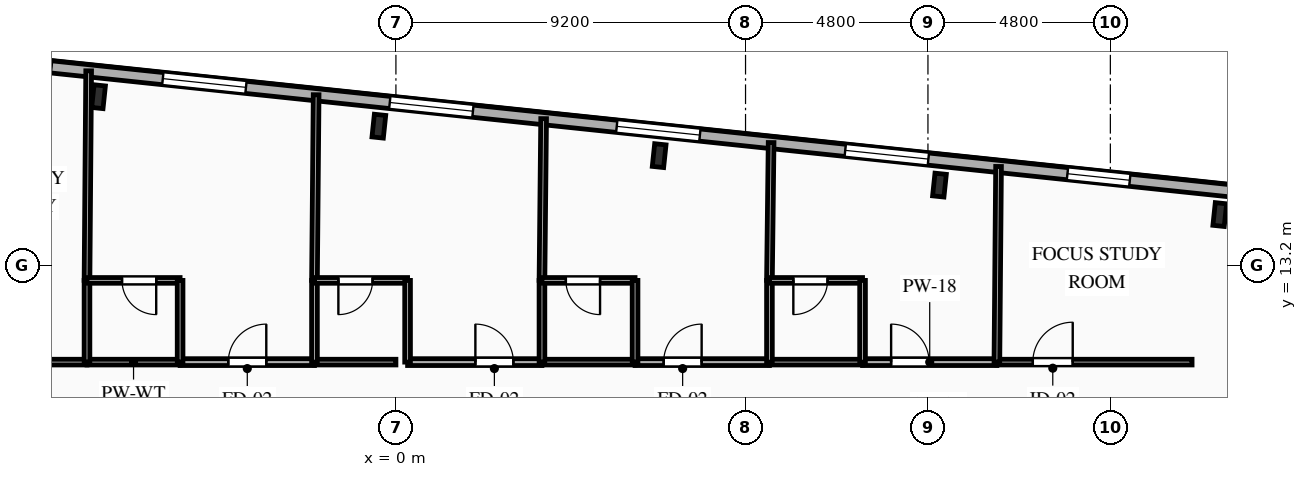
"""IFC4 building model, lengths in metres.
Left out: names, types, materials, properties, quantities, classifications, styles, units other than length and angle.
Written with IfcOpenShell. Run it as: python <this file> out.ifc"""

import sys

from ifc_helpers import new_model, si_unit, direction, frame, frame_2d, origin, origin_2d, place, context, subcontext, project, spatial, rectangle, i_section, extrude, element, fill, save


model = new_model("IFC4")
c1 = context("Model", 3, precision=1e-05, world=origin(), true_north=direction((0.0, 1.0)))
c2 = subcontext(c1, "Body", "Model", "MODEL_VIEW")
j1 = project(units=[si_unit("LENGTHUNIT", "METRE"), si_unit("PLANEANGLEUNIT", "RADIAN")], contexts=[c1])
p1 = place(None, origin())
s1 = spatial("IfcSite", under=j1, at=p1, CompositionType="ELEMENT")
p2 = place(p1, origin())
s2 = spatial("IfcBuilding", under=s1, at=p2, CompositionType="ELEMENT")
p3 = place(p2, frame((0.0, 0.0, 183.0)))
s3 = spatial("IfcBuildingStorey", under=s2, at=p3, CompositionType="ELEMENT", Elevation=183.0)
for number, where, z_axis, x_axis in (
    (1, (21.679, 14.532, 0.0), (0.0, 0.0, 1.0), (0.995, -0.105, 0.0)),
    (2, (14.303, 15.308, 0.0), (0.0, 0.0, 1.0), (0.995, -0.105, 0.0)),
    (3, (6.927, 16.083, 0.0), (0.0, 0.0, 1.0), (0.995, -0.105, 0.0)),
    (4, (-0.449, 16.858, 0.0), (0.0, 0.0, 1.0), (0.995, -0.105, 0.0)),
    (5, (-7.825, 17.634, 0.0), (0.0, 0.0, 1.0), (0.995, -0.105, 0.0)),
):
    element("IfcColumn", number, at=place(p3, frame(where, z_axis=z_axis, x_axis=x_axis)), inside=s3, PredefinedType="COLUMN", context=c2, shape_type="SweptSolid", body=[
        extrude(i_section(OverallWidth=0.3, OverallDepth=0.6, WebThickness=0.015, FlangeThickness=0.03, FilletRadius=0.027, at=origin_2d()), origin(), (0.0, 0.0, 1.0), 3.35),
    ])
p4 = place(p3, frame((-23.156, 19.898, 0.0), z_axis=(0.0, 0.0, 1.0), x_axis=(0.994522001802, -0.104527450613, 0.0)))
e6 = element("IfcWall", 6, at=p4, inside=s3, PredefinedType="SOLIDWALL", context=c2, shape_type="SweptSolid", body=[
    extrude(rectangle(XDim=45.8, YDim=0.32, at=frame_2d((22.9, 0.0))), origin(), (0.0, 0.0, 1.0), 3.04),
])
p5 = place(p4, frame((4.94, 0.0, 0.85)))
e7 = element("IfcOpeningElement", 7, at=p5, cuts=e6, PredefinedType="OPENING", context=c2, shape_type="SweptSolid", body=[
    extrude(rectangle(XDim=1.65, YDim=1.85, at=frame_2d((0.825, 0.925))), frame((0.0, 0.17, 0.0), z_axis=(0.0, -1.0, 0.0), x_axis=(1.0, 0.0, 0.0)), (0.0, 0.0, 1.0), 0.34),
])
p6 = place(p4, frame((12.572, 0.0, 0.85)))
e8 = element("IfcOpeningElement", 8, at=p6, cuts=e6, PredefinedType="OPENING", context=c2, shape_type="SweptSolid", body=[
    extrude(rectangle(XDim=1.6, YDim=1.85, at=frame_2d((0.8, 0.925))), frame((0.0, 0.17, 0.0), z_axis=(0.0, -1.0, 0.0), x_axis=(1.0, 0.0, 0.0)), (0.0, 0.0, 1.0), 0.34),
])
p7 = place(p4, frame((17.116, 0.0, 0.85)))
e9 = element("IfcOpeningElement", 9, at=p7, cuts=e6, PredefinedType="OPENING", context=c2, shape_type="SweptSolid", body=[
    extrude(rectangle(XDim=2.2, YDim=1.85, at=frame_2d((1.1, 0.925))), frame((0.0, 0.17, 0.0), z_axis=(0.0, -1.0, 0.0), x_axis=(1.0, 0.0, 0.0)), (0.0, 0.0, 1.0), 0.34),
])
p8 = place(p4, frame((23.121, 0.0, 0.85)))
e10 = element("IfcOpeningElement", 10, at=p8, cuts=e6, PredefinedType="OPENING", context=c2, shape_type="SweptSolid", body=[
    extrude(rectangle(XDim=2.2, YDim=1.85, at=frame_2d((1.1, 0.925))), frame((0.0, 0.17, 0.0), z_axis=(0.0, -1.0, 0.0), x_axis=(1.0, 0.0, 0.0)), (0.0, 0.0, 1.0), 0.34),
])
p9 = place(p4, frame((29.126, 0.0, 0.85)))
e11 = element("IfcOpeningElement", 11, at=p9, cuts=e6, PredefinedType="OPENING", context=c2, shape_type="SweptSolid", body=[
    extrude(rectangle(XDim=2.2, YDim=1.85, at=frame_2d((1.1, 0.925))), frame((0.0, 0.17, 0.0), z_axis=(0.0, -1.0, 0.0), x_axis=(1.0, 0.0, 0.0)), (0.0, 0.0, 1.0), 0.34),
])
p10 = place(p4, frame((35.172, 0.0, 0.85)))
e12 = element("IfcOpeningElement", 12, at=p10, cuts=e6, PredefinedType="OPENING", context=c2, shape_type="SweptSolid", body=[
    extrude(rectangle(XDim=2.2, YDim=1.85, at=frame_2d((1.1, 0.925))), frame((0.0, 0.17, 0.0), z_axis=(0.0, -1.0, 0.0), x_axis=(1.0, 0.0, 0.0)), (0.0, 0.0, 1.0), 0.34),
])
p11 = place(p4, frame((41.052, 0.0, 0.85)))
e13 = element("IfcOpeningElement", 13, at=p11, cuts=e6, PredefinedType="OPENING", context=c2, shape_type="SweptSolid", body=[
    extrude(rectangle(XDim=1.65, YDim=1.85, at=frame_2d((0.825, 0.925))), frame((0.0, 0.17, 0.0), z_axis=(0.0, -1.0, 0.0), x_axis=(1.0, 0.0, 0.0)), (0.0, 0.0, 1.0), 0.34),
])
p12 = place(p3, frame((-11.764, 10.65, 0.0), z_axis=(0.0, 0.0, 1.0), x_axis=(1.0, 0.0, 0.0)))
e14 = element("IfcWall", 14, at=p12, inside=s3, PredefinedType="PARTITIONING", context=c2, shape_type="SweptSolid", body=[
    extrude(rectangle(XDim=3.635, YDim=0.15, at=frame_2d((1.817, 0.0))), origin(), (0.0, 0.0, 1.0), 3.04),
])
p13 = place(p12, frame((0.771, 0.0, 0.0)))
e15 = element("IfcOpeningElement", 15, at=p13, cuts=e14, PredefinedType="OPENING", context=c2, shape_type="SweptSolid", body=[
    extrude(rectangle(XDim=0.95, YDim=2.1, at=frame_2d((0.475, 1.05))), frame((0.0, 0.085, 0.0), z_axis=(0.0, -1.0, 0.0), x_axis=(1.0, 0.0, 0.0)), (0.0, 0.0, 1.0), 0.17),
])
p14 = place(p3, frame((-5.679, 10.65, 0.0), z_axis=(0.0, 0.0, 1.0), x_axis=(1.0, 0.0, 0.0)))
e16 = element("IfcWall", 16, at=p14, inside=s3, PredefinedType="PARTITIONING", context=c2, shape_type="SweptSolid", body=[
    extrude(rectangle(XDim=3.536, YDim=0.18, at=frame_2d((1.768, 0.0))), origin(), (0.0, 0.0, 1.0), 3.04),
])
p15 = place(p14, frame((1.268, 0.0, 0.0)))
e17 = element("IfcOpeningElement", 17, at=p15, cuts=e16, PredefinedType="OPENING", context=c2, shape_type="SweptSolid", body=[
    extrude(rectangle(XDim=1.0, YDim=2.15, at=frame_2d((0.5, 1.075))), frame((0.0, 0.1, 0.0), z_axis=(0.0, -1.0, 0.0), x_axis=(1.0, 0.0, 0.0)), (0.0, 0.0, 1.0), 0.2),
])
p16 = place(p3, frame((-8.129, 10.65, 0.0), z_axis=(0.0, 0.0, 1.0), x_axis=(1.0, 0.0, 0.0)))
e18 = element("IfcWall", 18, at=p16, inside=s3, PredefinedType="PLUMBINGWALL", context=c2, shape_type="SweptSolid", body=[
    extrude(rectangle(XDim=2.45, YDim=0.15, at=frame_2d((1.225, 0.0))), origin(), (0.0, 0.0, 1.0), 3.04),
])
p17 = place(p3, frame((-2.143, 10.65, 0.0), z_axis=(0.0, 0.0, 1.0), x_axis=(1.0, 0.0, 0.0)))
e19 = element("IfcWall", 19, at=p17, inside=s3, PredefinedType="PLUMBINGWALL", context=c2, shape_type="SweptSolid", body=[
    extrude(rectangle(XDim=2.143, YDim=0.15, at=frame_2d((1.072, 0.0))), origin(), (0.0, 0.0, 1.0), 3.04),
])
p18 = place(p3, frame((0.307, 10.65, 0.0), z_axis=(0.0, 0.0, 1.0), x_axis=(1.0, 0.0, 0.0)))
e20 = element("IfcWall", 20, at=p18, inside=s3, PredefinedType="PARTITIONING", context=c2, shape_type="SweptSolid", body=[
    extrude(rectangle(XDim=3.536, YDim=0.18, at=frame_2d((1.768, 0.0))), origin(), (0.0, 0.0, 1.0), 3.04),
])
p19 = place(p18, frame((1.784, 0.0, 0.0)))
e21 = element("IfcOpeningElement", 21, at=p19, cuts=e20, PredefinedType="OPENING", context=c2, shape_type="SweptSolid", body=[
    extrude(rectangle(XDim=1.0, YDim=2.15, at=frame_2d((0.5, 1.075))), frame((0.0, 0.1, 0.0), z_axis=(0.0, -1.0, 0.0), x_axis=(1.0, 0.0, 0.0)), (0.0, 0.0, 1.0), 0.2),
])
p20 = place(p3, frame((6.293, 10.65, 0.0), z_axis=(0.0, 0.0, 1.0), x_axis=(1.0, 0.0, 0.0)))
e22 = element("IfcWall", 22, at=p20, inside=s3, PredefinedType="PARTITIONING", context=c2, shape_type="SweptSolid", body=[
    extrude(rectangle(XDim=3.536, YDim=0.18, at=frame_2d((1.768, 0.0))), origin(), (0.0, 0.0, 1.0), 3.04),
])
p21 = place(p20, frame((0.752, 0.0, 0.0)))
e23 = element("IfcOpeningElement", 23, at=p21, cuts=e22, PredefinedType="OPENING", context=c2, shape_type="SweptSolid", body=[
    extrude(rectangle(XDim=1.0, YDim=2.15, at=frame_2d((0.5, 1.075))), frame((0.0, 0.1, 0.0), z_axis=(0.0, -1.0, 0.0), x_axis=(1.0, 0.0, 0.0)), (0.0, 0.0, 1.0), 0.2),
])
p22 = place(p3, frame((3.843, 10.65, 0.0), z_axis=(0.0, 0.0, 1.0), x_axis=(1.0, 0.0, 0.0)))
e24 = element("IfcWall", 24, at=p22, inside=s3, PredefinedType="PLUMBINGWALL", context=c2, shape_type="SweptSolid", body=[
    extrude(rectangle(XDim=2.45, YDim=0.15, at=frame_2d((1.225, 0.0))), origin(), (0.0, 0.0, 1.0), 3.04),
])
p23 = place(p3, frame((12.279, 10.65, 0.0), z_axis=(0.0, 0.0, 1.0), x_axis=(1.0, 0.0, 0.0)))
e25 = element("IfcWall", 25, at=p23, inside=s3, PredefinedType="PARTITIONING", context=c2, shape_type="SweptSolid", body=[
    extrude(rectangle(XDim=3.535, YDim=0.18, at=frame_2d((1.768, 0.0))), origin(), (0.0, 0.0, 1.0), 3.04),
])
p24 = place(p23, frame((0.752, 0.0, 0.0)))
e26 = element("IfcOpeningElement", 26, at=p24, cuts=e25, PredefinedType="OPENING", context=c2, shape_type="SweptSolid", body=[
    extrude(rectangle(XDim=1.0, YDim=2.15, at=frame_2d((0.5, 1.075))), frame((0.0, 0.1, 0.0), z_axis=(0.0, -1.0, 0.0), x_axis=(1.0, 0.0, 0.0)), (0.0, 0.0, 1.0), 0.2),
])
p25 = place(p3, frame((9.829, 10.65, 0.0), z_axis=(0.0, 0.0, 1.0), x_axis=(1.0, 0.0, 0.0)))
e27 = element("IfcWall", 27, at=p25, inside=s3, PredefinedType="PLUMBINGWALL", context=c2, shape_type="SweptSolid", body=[
    extrude(rectangle(XDim=2.45, YDim=0.15, at=frame_2d((1.225, 0.0))), origin(), (0.0, 0.0, 1.0), 3.04),
])
p26 = place(p3, frame((15.814, 10.65, 0.0), z_axis=(0.0, 0.0, 1.0), x_axis=(1.0, 0.0, 0.0)))
e28 = element("IfcWall", 28, at=p26, inside=s3, PredefinedType="PARTITIONING", context=c2, shape_type="SweptSolid", body=[
    extrude(rectangle(XDim=5.136, YDim=0.15, at=frame_2d((2.568, 0.0))), origin(), (0.0, 0.0, 1.0), 3.04),
])
p27 = place(p26, frame((0.946, 0.0, 0.0)))
e29 = element("IfcOpeningElement", 29, at=p27, cuts=e28, PredefinedType="OPENING", context=c2, shape_type="SweptSolid", body=[
    extrude(rectangle(XDim=1.05, YDim=2.15, at=frame_2d((0.525, 1.075))), frame((0.0, 0.085, 0.0), z_axis=(0.0, -1.0, 0.0), x_axis=(1.0, 0.0, 0.0)), (0.0, 0.0, 1.0), 0.17),
])
p28 = place(p3, frame((-8.085, 18.314, 0.0), z_axis=(0.0, 0.0, 1.0), x_axis=(-0.007924663713, -0.99996859936, 0.0)))
e30 = element("IfcWall", 30, at=p28, inside=s3, PredefinedType="PARTITIONING", context=c2, shape_type="SweptSolid", body=[
    extrude(rectangle(XDim=5.515, YDim=0.15, at=frame_2d((2.757, 0.0))), origin(), (0.0, 0.0, 1.0), 2.665),
])
p29 = place(p3, frame((-8.129, 12.8, 0.0), z_axis=(0.0, 0.0, 1.0), x_axis=(0.0, -1.0, 0.0)))
e31 = element("IfcWall", 31, at=p29, inside=s3, PredefinedType="PLUMBINGWALL", context=c2, shape_type="SweptSolid", body=[
    extrude(rectangle(XDim=2.15, YDim=0.15, at=frame_2d((1.075, 0.0))), origin(), (0.0, 0.0, 1.0), 3.04),
])
p30 = place(p3, frame((-5.679, 12.8, 0.0), z_axis=(0.0, 0.0, 1.0), x_axis=(-1.0, 0.0, 0.0)))
e32 = element("IfcWall", 32, at=p30, inside=s3, PredefinedType="PLUMBINGWALL", context=c2, shape_type="SweptSolid", body=[
    extrude(rectangle(XDim=2.45, YDim=0.15, at=frame_2d((1.225, 0.0))), origin(), (0.0, 0.0, 1.0), 3.04),
])
p31 = place(p30, frame((0.629, 0.0, 0.0)))
e33 = element("IfcOpeningElement", 33, at=p31, cuts=e32, PredefinedType="OPENING", context=c2, shape_type="SweptSolid", body=[
    extrude(rectangle(XDim=0.9, YDim=2.1, at=frame_2d((0.45, 1.05))), frame((0.0, 0.085, 0.0), z_axis=(0.0, -1.0, 0.0), x_axis=(1.0, 0.0, 0.0)), (0.0, 0.0, 1.0), 0.17),
])
p32 = place(p3, frame((-5.679, 10.65, 0.0), z_axis=(0.0, 0.0, 1.0), x_axis=(0.0, 1.0, 0.0)))
e34 = element("IfcWall", 34, at=p32, inside=s3, PredefinedType="PLUMBINGWALL", context=c2, shape_type="SweptSolid", body=[
    extrude(rectangle(XDim=2.15, YDim=0.15, at=frame_2d((1.075, 0.0))), origin(), (0.0, 0.0, 1.0), 3.04),
])
p33 = place(p3, frame((-2.099, 17.685, 0.0), z_axis=(0.0, 0.0, 1.0), x_axis=(-0.008995138317, -0.999959542925, 0.0)))
e35 = element("IfcWall", 35, at=p33, inside=s3, PredefinedType="PARTITIONING", context=c2, shape_type="SweptSolid", body=[
    extrude(rectangle(XDim=4.885, YDim=0.15, at=frame_2d((2.443, 0.0))), origin(), (0.0, 0.0, 1.0), 3.04),
])
p34 = place(p3, frame((-2.143, 12.8, 0.0), z_axis=(0.0, 0.0, 1.0), x_axis=(0.0, -1.0, 0.0)))
e36 = element("IfcWall", 36, at=p34, inside=s3, PredefinedType="PLUMBINGWALL", context=c2, shape_type="SweptSolid", body=[
    extrude(rectangle(XDim=2.15, YDim=0.15, at=frame_2d((1.075, 0.0))), origin(), (0.0, 0.0, 1.0), 3.04),
])
p35 = place(p3, frame((0.307, 12.8, 0.0), z_axis=(0.0, 0.0, 1.0), x_axis=(-1.0, 0.0, 0.0)))
e37 = element("IfcWall", 37, at=p35, inside=s3, PredefinedType="PLUMBINGWALL", context=c2, shape_type="SweptSolid", body=[
    extrude(rectangle(XDim=2.45, YDim=0.15, at=frame_2d((1.225, 0.0))), origin(), (0.0, 0.0, 1.0), 3.04),
])
p36 = place(p35, frame((0.921, 0.0, 0.0)))
e38 = element("IfcOpeningElement", 38, at=p36, cuts=e37, PredefinedType="OPENING", context=c2, shape_type="SweptSolid", body=[
    extrude(rectangle(XDim=0.9, YDim=2.1, at=frame_2d((0.45, 1.05))), frame((0.0, 0.085, 0.0), z_axis=(0.0, -1.0, 0.0), x_axis=(1.0, 0.0, 0.0)), (0.0, 0.0, 1.0), 0.17),
])
p37 = place(p3, frame((0.307, 10.65, 0.0), z_axis=(0.0, 0.0, 1.0), x_axis=(0.0, 1.0, 0.0)))
e39 = element("IfcWall", 39, at=p37, inside=s3, PredefinedType="PLUMBINGWALL", context=c2, shape_type="SweptSolid", body=[
    extrude(rectangle(XDim=2.15, YDim=0.15, at=frame_2d((1.075, 0.0))), origin(), (0.0, 0.0, 1.0), 3.04),
])
p38 = place(p3, frame((3.887, 17.056, 0.0), z_axis=(0.0, 0.0, 1.0), x_axis=(-0.010324694878, -0.999946698917, 0.0)))
e40 = element("IfcWall", 40, at=p38, inside=s3, PredefinedType="PARTITIONING", context=c2, shape_type="SweptSolid", body=[
    extrude(rectangle(XDim=4.256, YDim=0.15, at=frame_2d((2.128, 0.0))), origin(), (0.0, 0.0, 1.0), 3.04),
])
p39 = place(p3, frame((3.843, 12.8, 0.0), z_axis=(0.0, 0.0, 1.0), x_axis=(0.0, -1.0, 0.0)))
e41 = element("IfcWall", 41, at=p39, inside=s3, PredefinedType="PLUMBINGWALL", context=c2, shape_type="SweptSolid", body=[
    extrude(rectangle(XDim=2.15, YDim=0.15, at=frame_2d((1.075, 0.0))), origin(), (0.0, 0.0, 1.0), 3.04),
])
p40 = place(p3, frame((6.293, 12.8, 0.0), z_axis=(0.0, 0.0, 1.0), x_axis=(-1.0, 0.0, 0.0)))
e42 = element("IfcWall", 42, at=p40, inside=s3, PredefinedType="PLUMBINGWALL", context=c2, shape_type="SweptSolid", body=[
    extrude(rectangle(XDim=2.45, YDim=0.15, at=frame_2d((1.225, 0.0))), origin(), (0.0, 0.0, 1.0), 3.04),
])
p41 = place(p40, frame((0.921, 0.0, 0.0)))
e43 = element("IfcOpeningElement", 43, at=p41, cuts=e42, PredefinedType="OPENING", context=c2, shape_type="SweptSolid", body=[
    extrude(rectangle(XDim=0.9, YDim=2.1, at=frame_2d((0.45, 1.05))), frame((0.0, 0.085, 0.0), z_axis=(0.0, -1.0, 0.0), x_axis=(1.0, 0.0, 0.0)), (0.0, 0.0, 1.0), 0.17),
])
p42 = place(p3, frame((6.293, 10.65, 0.0), z_axis=(0.0, 0.0, 1.0), x_axis=(0.0, 1.0, 0.0)))
e44 = element("IfcWall", 44, at=p42, inside=s3, PredefinedType="PLUMBINGWALL", context=c2, shape_type="SweptSolid", body=[
    extrude(rectangle(XDim=2.15, YDim=0.15, at=frame_2d((1.075, 0.0))), origin(), (0.0, 0.0, 1.0), 3.04),
])
p43 = place(p3, frame((9.873, 16.427, 0.0), z_axis=(0.0, 0.0, 1.0), x_axis=(-0.012048129237, -0.999927418657, 0.0)))
e45 = element("IfcWall", 45, at=p43, inside=s3, PredefinedType="PARTITIONING", context=c2, shape_type="SweptSolid", body=[
    extrude(rectangle(XDim=3.627, YDim=0.15, at=frame_2d((1.813, 0.0))), origin(), (0.0, 0.0, 1.0), 3.04),
])
p44 = place(p3, frame((9.829, 12.8, 0.0), z_axis=(0.0, 0.0, 1.0), x_axis=(0.0, -1.0, 0.0)))
e46 = element("IfcWall", 46, at=p44, inside=s3, PredefinedType="PLUMBINGWALL", context=c2, shape_type="SweptSolid", body=[
    extrude(rectangle(XDim=2.15, YDim=0.15, at=frame_2d((1.075, 0.0))), origin(), (0.0, 0.0, 1.0), 3.04),
])
p45 = place(p3, frame((12.279, 12.8, 0.0), z_axis=(0.0, 0.0, 1.0), x_axis=(-1.0, 0.0, 0.0)))
e47 = element("IfcWall", 47, at=p45, inside=s3, PredefinedType="PLUMBINGWALL", context=c2, shape_type="SweptSolid", body=[
    extrude(rectangle(XDim=2.45, YDim=0.15, at=frame_2d((1.225, 0.0))), origin(), (0.0, 0.0, 1.0), 3.04),
])
p46 = place(p45, frame((0.921, 0.0, 0.0)))
e48 = element("IfcOpeningElement", 48, at=p46, cuts=e47, PredefinedType="OPENING", context=c2, shape_type="SweptSolid", body=[
    extrude(rectangle(XDim=0.9, YDim=2.1, at=frame_2d((0.45, 1.05))), frame((0.0, 0.085, 0.0), z_axis=(0.0, -1.0, 0.0), x_axis=(1.0, 0.0, 0.0)), (0.0, 0.0, 1.0), 0.17),
])
p47 = place(p3, frame((12.279, 10.65, 0.0), z_axis=(0.0, 0.0, 1.0), x_axis=(0.0, 1.0, 0.0)))
e49 = element("IfcWall", 49, at=p47, inside=s3, PredefinedType="PLUMBINGWALL", context=c2, shape_type="SweptSolid", body=[
    extrude(rectangle(XDim=2.15, YDim=0.15, at=frame_2d((1.075, 0.0))), origin(), (0.0, 0.0, 1.0), 3.04),
])
p48 = place(p3, frame((15.858, 15.798, 0.0), z_axis=(0.0, 0.0, 1.0), x_axis=(-0.008536158681, -0.999963566334, 0.0)))
e50 = element("IfcWall", 50, at=p48, inside=s3, PredefinedType="PARTITIONING", context=c2, shape_type="SweptSolid", body=[
    extrude(rectangle(XDim=5.148, YDim=0.15, at=frame_2d((2.574, 0.0))), origin(), (0.0, 0.0, 1.0), 3.04),
])
p49 = place(p7, origin())
e51 = element("IfcWindow", 51, at=p49, inside=s3, PartitioningType="SINGLE_PANEL", PredefinedType="WINDOW", context=c2, shape_type="SweptSolid", body=[
    extrude(rectangle(XDim=2.2, YDim=1.85, at=frame_2d((1.1, 0.925))), frame((0.0, 0.03, 0.0), z_axis=(0.0, -1.0, 0.0), x_axis=(1.0, 0.0, 0.0)), (0.0, 0.0, 1.0), 0.06),
])
fill(e9, e51)
p50 = place(p8, origin())
e52 = element("IfcWindow", 52, at=p50, inside=s3, PartitioningType="SINGLE_PANEL", PredefinedType="WINDOW", context=c2, shape_type="SweptSolid", body=[
    extrude(rectangle(XDim=2.2, YDim=1.85, at=frame_2d((1.1, 0.925))), frame((0.0, 0.03, 0.0), z_axis=(0.0, -1.0, 0.0), x_axis=(1.0, 0.0, 0.0)), (0.0, 0.0, 1.0), 0.06),
])
fill(e10, e52)
p51 = place(p9, origin())
e53 = element("IfcWindow", 53, at=p51, inside=s3, PartitioningType="SINGLE_PANEL", PredefinedType="WINDOW", context=c2, shape_type="SweptSolid", body=[
    extrude(rectangle(XDim=2.2, YDim=1.85, at=frame_2d((1.1, 0.925))), frame((0.0, 0.03, 0.0), z_axis=(0.0, -1.0, 0.0), x_axis=(1.0, 0.0, 0.0)), (0.0, 0.0, 1.0), 0.06),
])
fill(e11, e53)
p52 = place(p10, origin())
e54 = element("IfcWindow", 54, at=p52, inside=s3, PartitioningType="SINGLE_PANEL", PredefinedType="WINDOW", context=c2, shape_type="SweptSolid", body=[
    extrude(rectangle(XDim=2.2, YDim=1.85, at=frame_2d((1.1, 0.925))), frame((0.0, 0.03, 0.0), z_axis=(0.0, -1.0, 0.0), x_axis=(1.0, 0.0, 0.0)), (0.0, 0.0, 1.0), 0.06),
])
fill(e12, e54)
p53 = place(p11, origin())
e55 = element("IfcWindow", 55, at=p53, inside=s3, PartitioningType="SINGLE_PANEL", PredefinedType="WINDOW", context=c2, shape_type="SweptSolid", body=[
    extrude(rectangle(XDim=1.65, YDim=1.85, at=frame_2d((0.825, 0.925))), frame((0.0, 0.03, 0.0), z_axis=(0.0, -1.0, 0.0), x_axis=(1.0, 0.0, 0.0)), (0.0, 0.0, 1.0), 0.06),
])
fill(e13, e55)
p54 = place(p15, origin())
e56 = element("IfcDoor", 56, at=p54, inside=s3, OperationType="SINGLE_SWING_RIGHT", PredefinedType="DOOR", context=c2, shape_type="SweptSolid", body=[
    extrude(rectangle(XDim=1.0, YDim=2.15, at=frame_2d((0.5, 1.075))), frame((0.0, 0.025, 0.0), z_axis=(0.0, -1.0, 0.0), x_axis=(1.0, 0.0, 0.0)), (0.0, 0.0, 1.0), 0.05),
])
fill(e17, e56)
p55 = place(p19, origin())
e57 = element("IfcDoor", 57, at=p55, inside=s3, OperationType="SINGLE_SWING_LEFT", PredefinedType="DOOR", context=c2, shape_type="SweptSolid", body=[
    extrude(rectangle(XDim=1.0, YDim=2.15, at=frame_2d((0.5, 1.075))), frame((0.0, 0.025, 0.0), z_axis=(0.0, -1.0, 0.0), x_axis=(1.0, 0.0, 0.0)), (0.0, 0.0, 1.0), 0.05),
])
fill(e21, e57)
p56 = place(p21, origin())
e58 = element("IfcDoor", 58, at=p56, inside=s3, OperationType="SINGLE_SWING_RIGHT", PredefinedType="DOOR", context=c2, shape_type="SweptSolid", body=[
    extrude(rectangle(XDim=1.0, YDim=2.15, at=frame_2d((0.5, 1.075))), frame((0.0, 0.025, 0.0), z_axis=(0.0, -1.0, 0.0), x_axis=(1.0, 0.0, 0.0)), (0.0, 0.0, 1.0), 0.05),
])
fill(e23, e58)
p57 = place(p24, origin())
e59 = element("IfcDoor", 59, at=p57, inside=s3, OperationType="SINGLE_SWING_LEFT", PredefinedType="DOOR", context=c2, shape_type="SweptSolid", body=[
    extrude(rectangle(XDim=1.0, YDim=2.15, at=frame_2d((0.5, 1.075))), frame((0.0, 0.025, 0.0), z_axis=(0.0, -1.0, 0.0), x_axis=(1.0, 0.0, 0.0)), (0.0, 0.0, 1.0), 0.05),
])
fill(e26, e59)
p58 = place(p27, origin())
e60 = element("IfcDoor", 60, at=p58, inside=s3, OperationType="SINGLE_SWING_RIGHT", PredefinedType="DOOR", context=c2, shape_type="SweptSolid", body=[
    extrude(rectangle(XDim=1.05, YDim=2.15, at=frame_2d((0.525, 1.075))), frame((0.0, 0.025, 0.0), z_axis=(0.0, -1.0, 0.0), x_axis=(1.0, 0.0, 0.0)), (0.0, 0.0, 1.0), 0.05),
])
fill(e29, e60)
p59 = place(p31, origin())
e61 = element("IfcDoor", 61, at=p59, inside=s3, OperationType="SINGLE_SWING_LEFT", PredefinedType="DOOR", context=c2, shape_type="SweptSolid", body=[
    extrude(rectangle(XDim=0.9, YDim=2.1, at=frame_2d((0.45, 1.05))), frame((0.0, 0.025, 0.0), z_axis=(0.0, -1.0, 0.0), x_axis=(1.0, 0.0, 0.0)), (0.0, 0.0, 1.0), 0.05),
])
fill(e33, e61)
p60 = place(p36, origin())
e62 = element("IfcDoor", 62, at=p60, inside=s3, OperationType="SINGLE_SWING_RIGHT", PredefinedType="DOOR", context=c2, shape_type="SweptSolid", body=[
    extrude(rectangle(XDim=0.9, YDim=2.1, at=frame_2d((0.45, 1.05))), frame((0.0, 0.025, 0.0), z_axis=(0.0, -1.0, 0.0), x_axis=(1.0, 0.0, 0.0)), (0.0, 0.0, 1.0), 0.05),
])
fill(e38, e62)
p61 = place(p41, origin())
e63 = element("IfcDoor", 63, at=p61, inside=s3, OperationType="SINGLE_SWING_LEFT", PredefinedType="DOOR", context=c2, shape_type="SweptSolid", body=[
    extrude(rectangle(XDim=0.9, YDim=2.1, at=frame_2d((0.45, 1.05))), frame((0.0, 0.025, 0.0), z_axis=(0.0, -1.0, 0.0), x_axis=(1.0, 0.0, 0.0)), (0.0, 0.0, 1.0), 0.05),
])
fill(e43, e63)
p62 = place(p46, origin())
e64 = element("IfcDoor", 64, at=p62, inside=s3, OperationType="SINGLE_SWING_RIGHT", PredefinedType="DOOR", context=c2, shape_type="SweptSolid", body=[
    extrude(rectangle(XDim=0.9, YDim=2.1, at=frame_2d((0.45, 1.05))), frame((0.0, 0.025, 0.0), z_axis=(0.0, -1.0, 0.0), x_axis=(1.0, 0.0, 0.0)), (0.0, 0.0, 1.0), 0.05),
])
fill(e48, e64)
save(model, sys.argv[1])
